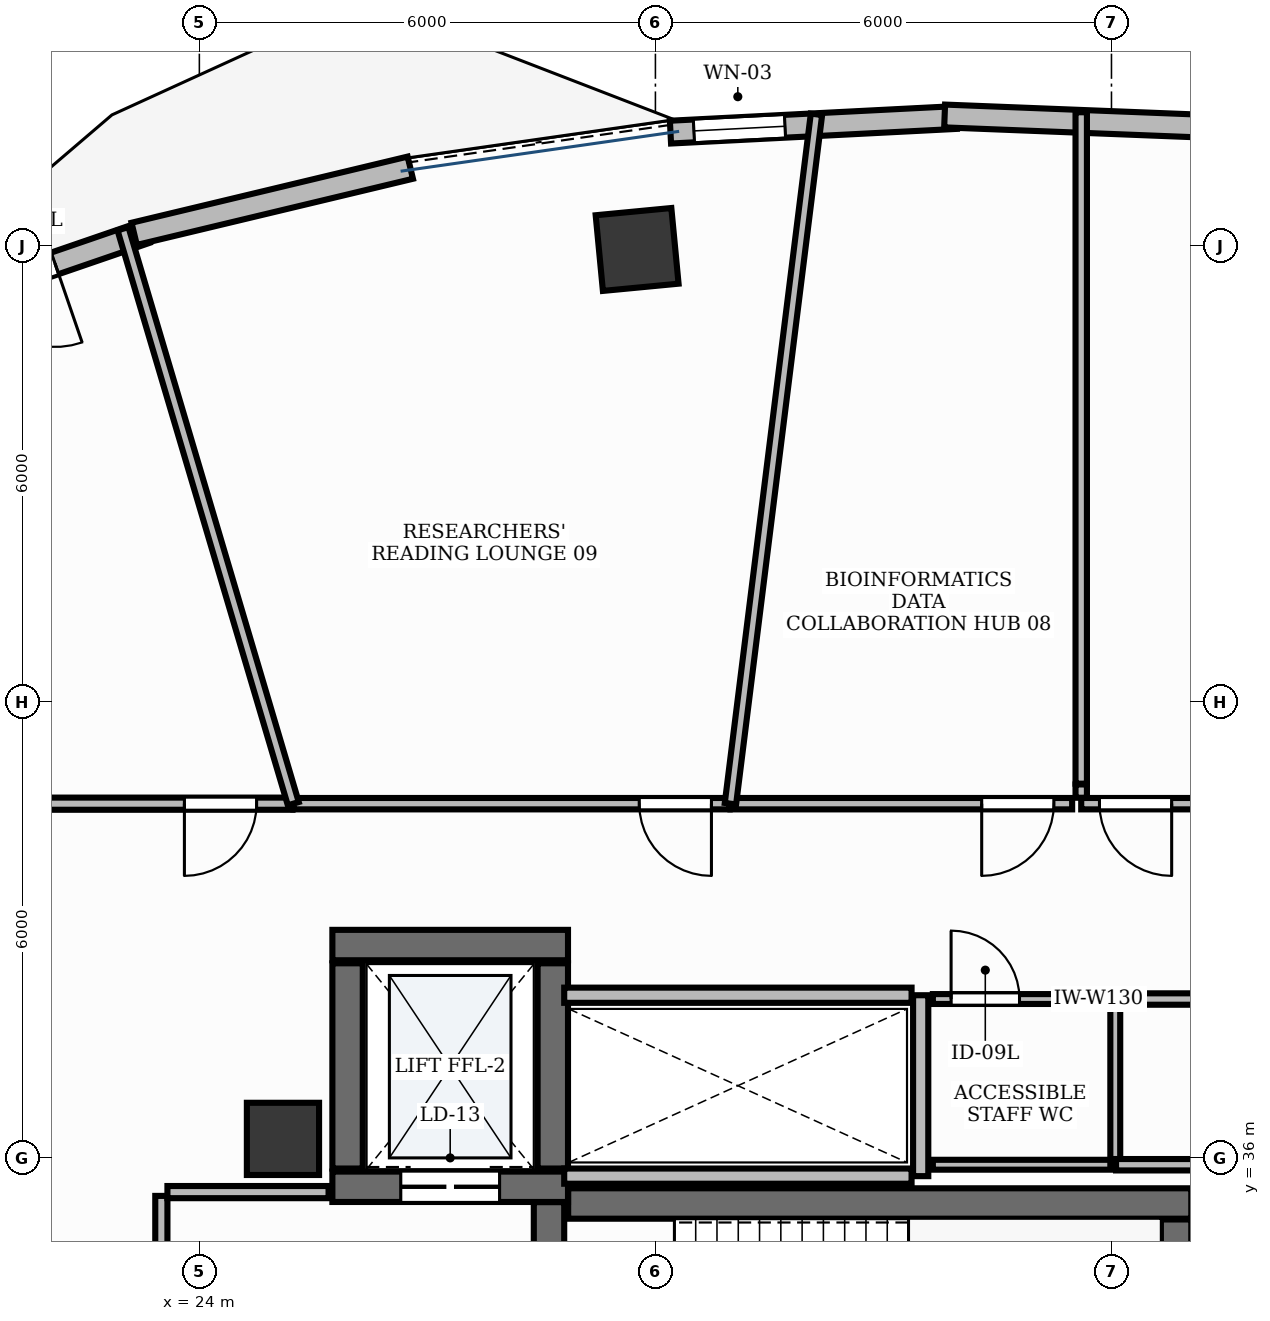
"""IFC4 building model, lengths in metres.
Left out: names, types, materials, properties, quantities, classifications, styles, units other than length and angle.
Written with IfcOpenShell. Run it as: python <this file> out.ifc"""

import sys

from ifc_helpers import new_model, si_unit, direction, frame, frame_2d, origin, origin_2d, place, context, subcontext, project, spatial, rectangle, extrude, element, fill, save


model = new_model("IFC4")
c1 = context("Model", 3, precision=1e-05, world=origin(), true_north=direction((0.0, 1.0)))
c2 = subcontext(c1, "Body", "Model", "MODEL_VIEW")
j1 = project(units=[si_unit("LENGTHUNIT", "METRE"), si_unit("PLANEANGLEUNIT", "RADIAN")], contexts=[c1])
p1 = place(None, origin())
s1 = spatial("IfcSite", under=j1, at=p1, CompositionType="ELEMENT")
p2 = place(p1, origin())
s2 = spatial("IfcBuilding", under=s1, at=p2, CompositionType="ELEMENT")
p3 = place(p2, frame((0.0, 0.0, 222.6)))
s3 = spatial("IfcBuildingStorey", under=s2, at=p3, CompositionType="ELEMENT", Elevation=222.6)
p4 = place(p3, frame((28.852, 35.4, 0.0), z_axis=(0.0, 0.0, 1.0), x_axis=(1.0, 0.0, 0.0)))
e1 = element("IfcWall", 1, at=p4, inside=s3, PredefinedType="SHEAR", context=c2, shape_type="SweptSolid", body=[
    extrude(rectangle(XDim=8.198, YDim=0.4, at=frame_2d((4.099, 0.0))), origin(), (0.0, 0.0, 1.0), 3.9),
])
p5 = place(p3, frame((36.85, 32.11, 0.0), z_axis=(0.0, 0.0, 1.0), x_axis=(0.0, 1.0, 0.0)))
e2 = element("IfcWall", 2, at=p5, inside=s3, PredefinedType="SHEAR", context=c2, shape_type="SweptSolid", body=[
    extrude(rectangle(XDim=3.08, YDim=0.4, at=frame_2d((1.54, 0.0))), origin(), (0.0, 0.0, 1.0), 3.9),
])
p6 = place(p3, frame((28.6, 32.11, 0.0), z_axis=(0.0, 0.0, 1.0), x_axis=(0.0, 1.0, 0.0)))
e3 = element("IfcWall", 3, at=p6, inside=s3, PredefinedType="SHEAR", context=c2, shape_type="SweptSolid", body=[
    extrude(rectangle(XDim=3.308, YDim=0.4, at=frame_2d((1.654, 0.0))), origin(), (0.0, 0.0, 1.0), 3.9),
])
p7 = place(p6, frame((0.2, 0.0, 0.0)))
e4 = element("IfcOpeningElement", 4, at=p7, cuts=e3, PredefinedType="OPENING", context=c2, shape_type="SweptSolid", body=[
    extrude(rectangle(XDim=1.05, YDim=2.15, at=frame_2d((0.525, 1.075))), frame((0.0, 0.215, 0.0), z_axis=(0.0, -1.0, 0.0), x_axis=(1.0, 0.0, 0.0)), (0.0, 0.0, 1.0), 0.43),
])
p8 = place(p3, frame((25.75, 38.8, 0.0), z_axis=(0.0, 0.0, 1.0), x_axis=(1.0, 0.0, 0.0)))
e5 = element("IfcWall", 5, at=p8, inside=s3, PredefinedType="SHEAR", context=c2, shape_type="SweptSolid", body=[
    extrude(rectangle(XDim=3.1, YDim=0.4, at=frame_2d((1.55, 0.0))), origin(), (0.0, 0.0, 1.0), 3.9),
])
p9 = place(p3, frame((25.75, 35.62, 0.0), z_axis=(0.0, 0.0, 1.0), x_axis=(1.0, 0.0, 0.0)))
e6 = element("IfcWall", 6, at=p9, inside=s3, PredefinedType="SHEAR", context=c2, shape_type="SweptSolid", body=[
    extrude(rectangle(XDim=3.1, YDim=0.4, at=frame_2d((1.55, 0.0))), origin(), (0.0, 0.0, 1.0), 3.9),
])
p10 = place(p9, frame((0.9, 0.0, 0.0)))
e7 = element("IfcOpeningElement", 7, at=p10, cuts=e6, PredefinedType="OPENING", context=c2, shape_type="SweptSolid", body=[
    extrude(rectangle(XDim=1.3, YDim=2.2, at=frame_2d((0.65, 1.1))), frame((0.0, 0.215, 0.0), z_axis=(0.0, -1.0, 0.0), x_axis=(1.0, 0.0, 0.0)), (0.0, 0.0, 1.0), 0.43),
])
for number, where, z_axis, x_axis in (
    (8, (25.95, 35.86, 0.0), (0.0, 0.0, 1.0), (0.0, 1.0, 0.0)),
    (9, (28.65, 35.86, 0.0), (0.0, 0.0, 1.0), (0.0, 1.0, 0.0)),
):
    element("IfcWall", number, at=place(p3, frame(where, z_axis=z_axis, x_axis=x_axis)), inside=s3, PredefinedType="SHEAR", context=c2, shape_type="SweptSolid", body=[
        extrude(rectangle(XDim=2.7, YDim=0.4, at=frame_2d((1.35, 0.0))), origin(), (0.0, 0.0, 1.0), 3.9),
    ])
p11 = place(p3, frame((25.1, 36.25, -0.0), z_axis=(0.0, 0.0, 1.0), x_axis=(1.0, 0.0, 0.0)))
e10 = element("IfcColumn", 10, at=p11, inside=s3, PredefinedType="PILASTER", context=c2, shape_type="SweptSolid", body=[
    extrude(rectangle(XDim=0.95, YDim=0.95, at=origin_2d()), origin(), (0.0, 0.0, 1.0), 3.901),
])
p12 = place(p3, frame((29.759, 47.951, -0.0), z_axis=(0.0, 0.0, 1.0), x_axis=(0.995462868748, 0.095150811579, 0.0)))
e11 = element("IfcColumn", 11, at=p12, inside=s3, PredefinedType="COLUMN", context=c2, shape_type="SweptSolid", body=[
    extrude(rectangle(XDim=1.0, YDim=1.0, at=origin_2d()), origin(), (0.0, 0.0, 1.0), 3.901),
])
p13 = place(p3, frame((33.958, 49.688, 0.0), z_axis=(0.0, 0.0, 1.0), x_axis=(-0.998693948377, -0.051092049037, 0.0)))
e12 = element("IfcWall", 12, at=p13, inside=s3, PredefinedType="STANDARD", context=c2, shape_type="SweptSolid", body=[
    extrude(rectangle(XDim=3.765, YDim=0.3, at=frame_2d((1.883, 0.0))), origin(), (0.0, 0.0, 1.0), 3.9),
])
p14 = place(p13, frame((2.257, 0.0, 0.9)))
e13 = element("IfcOpeningElement", 13, at=p14, cuts=e12, PredefinedType="OPENING", context=c2, shape_type="SweptSolid", body=[
    extrude(rectangle(XDim=1.2, YDim=2.7, at=frame_2d((0.6, 1.35))), frame((0.0, 0.165, 0.0), z_axis=(0.0, -1.0, 0.0), x_axis=(1.0, 0.0, 0.0)), (0.0, 0.0, 1.0), 0.33),
])
p15 = place(p3, frame((23.296, 48.18, 0.0), z_axis=(0.0, 0.0, 1.0), x_axis=(-0.945702753898, -0.325032769531, 0.0)))
e14 = element("IfcWall", 14, at=p15, inside=s3, PredefinedType="STANDARD", context=c2, shape_type="SweptSolid", body=[
    extrude(rectangle(XDim=3.629, YDim=0.3, at=frame_2d((1.815, 0.0))), origin(), (0.0, 0.0, 1.0), 3.9),
])
p16 = place(p15, frame((1.265, 0.0, 0.0)))
e15 = element("IfcOpeningElement", 15, at=p16, cuts=e14, PredefinedType="OPENING", context=c2, shape_type="SweptSolid", body=[
    extrude(rectangle(XDim=1.1, YDim=2.15, at=frame_2d((0.55, 1.075))), frame((0.0, 0.165, 0.0), z_axis=(0.0, -1.0, 0.0), x_axis=(1.0, 0.0, 0.0)), (0.0, 0.0, 1.0), 0.33),
])
p17 = place(p3, frame((37.609, 49.557, 0.0), z_axis=(0.0, 0.0, 1.0), x_axis=(-0.999221923177, 0.039440439173, 0.0)))
e16 = element("IfcWall", 16, at=p17, inside=s3, PredefinedType="STANDARD", context=c2, shape_type="SweptSolid", body=[
    extrude(rectangle(XDim=3.807, YDim=0.3, at=frame_2d((1.903, 0.0))), origin(), (0.0, 0.0, 1.0), 3.9),
])
p18 = place(p3, frame((26.775, 49.027, 0.0), z_axis=(0.0, 0.0, 1.0), x_axis=(-0.972475629939, -0.233004611918, 0.0)))
e17 = element("IfcWall", 17, at=p18, inside=s3, PredefinedType="STANDARD", context=c2, shape_type="SweptSolid", body=[
    extrude(rectangle(XDim=3.735, YDim=0.3, at=frame_2d((1.868, 0.0))), origin(), (0.0, 0.0, 1.0), 3.9),
])
p19 = place(p3, frame((33.49, 35.76, 0.0), z_axis=(0.0, 0.0, 1.0), x_axis=(0.0, 1.0, 0.0)))
e18 = element("IfcWall", 18, at=p19, inside=s3, PredefinedType="PARTITIONING", context=c2, shape_type="SweptSolid", body=[
    extrude(rectangle(XDim=2.38, YDim=0.2, at=frame_2d((1.19, 0.0))), origin(), (0.0, 0.0, 1.0), 2.91),
])
for number, where, z_axis, x_axis in (
    (19, (28.8, 35.76, 0.0), (0.0, 0.0, 1.0), (1.0, 0.0, 0.0)),
    (20, (28.8, 38.14, 0.0), (0.0, 0.0, 1.0), (1.0, 0.0, 0.0)),
):
    element("IfcWall", number, at=place(p3, frame(where, z_axis=z_axis, x_axis=x_axis)), inside=s3, PredefinedType="PARTITIONING", context=c2, shape_type="SweptSolid", body=[
        extrude(rectangle(XDim=4.57, YDim=0.2, at=frame_2d((2.285, 0.0))), origin(), (0.0, 0.0, 1.0), 2.91),
    ])
p20 = place(p3, frame((23.5, 32.1, 0.0), z_axis=(0.0, 0.0, 1.0), x_axis=(0.0, 1.0, 0.0)))
e21 = element("IfcWall", 21, at=p20, inside=s3, PredefinedType="PARTITIONING", context=c2, shape_type="SweptSolid", body=[
    extrude(rectangle(XDim=3.4, YDim=0.16, at=frame_2d((1.7, 0.0))), origin(), (0.0, 0.0, 1.0), 2.91),
])
p21 = place(p20, frame((1.175, 0.0, 0.0)))
e22 = element("IfcOpeningElement", 22, at=p21, cuts=e21, PredefinedType="OPENING", context=c2, shape_type="SweptSolid", body=[
    extrude(rectangle(XDim=1.05, YDim=2.15, at=frame_2d((0.525, 1.075))), frame((0.0, 0.095, 0.0), z_axis=(0.0, -1.0, 0.0), x_axis=(1.0, 0.0, 0.0)), (0.0, 0.0, 1.0), 0.19),
])
p22 = place(p3, frame((23.58, 35.55, 0.0), z_axis=(0.0, 0.0, 1.0), x_axis=(1.0, 0.0, 0.0)))
e23 = element("IfcWall", 23, at=p22, inside=s3, PredefinedType="PARTITIONING", context=c2, shape_type="SweptSolid", body=[
    extrude(rectangle(XDim=2.12, YDim=0.16, at=frame_2d((1.06, 0.0))), origin(), (0.0, 0.0, 1.0), 2.91),
])
p23 = place(p3, frame((33.65, 38.09, 0.0), z_axis=(0.0, 0.0, 1.0), x_axis=(1.0, 0.0, 0.0)))
e24 = element("IfcWall", 24, at=p23, inside=s3, PredefinedType="PARTITIONING", context=c2, shape_type="SweptSolid", body=[
    extrude(rectangle(XDim=2.4, YDim=0.13, at=frame_2d((1.2, 0.0))), origin(), (0.0, 0.0, 1.0), 2.91),
])
p24 = place(p23, frame((0.24, 0.0, 0.0)))
e25 = element("IfcOpeningElement", 25, at=p24, cuts=e24, PredefinedType="OPENING", context=c2, shape_type="SweptSolid", body=[
    extrude(rectangle(XDim=0.9, YDim=2.15, at=frame_2d((0.45, 1.075))), frame((0.0, 0.08, 0.0), z_axis=(0.0, -1.0, 0.0), x_axis=(1.0, 0.0, 0.0)), (0.0, 0.0, 1.0), 0.16),
])
p25 = place(p3, frame((37.2, 40.66, 0.0), z_axis=(0.0, 0.0, 1.0), x_axis=(-1.0, 0.0, 0.0)))
e26 = element("IfcWall", 26, at=p25, inside=s3, PredefinedType="PARTITIONING", context=c2, shape_type="SweptSolid", body=[
    extrude(rectangle(XDim=1.598, YDim=0.15, at=frame_2d((0.799, 0.0))), origin(), (0.0, 0.0, 1.0), 2.91),
])
p26 = place(p25, frame((0.408, 0.0, 0.0)))
e27 = element("IfcOpeningElement", 27, at=p26, cuts=e26, PredefinedType="OPENING", context=c2, shape_type="SweptSolid", body=[
    extrude(rectangle(XDim=0.95, YDim=2.15, at=frame_2d((0.475, 1.075))), frame((0.0, 0.09, 0.0), z_axis=(0.0, -1.0, 0.0), x_axis=(1.0, 0.0, 0.0)), (0.0, 0.0, 1.0), 0.18),
])
p27 = place(p3, frame((35.483, 40.66, 0.0), z_axis=(0.0, 0.0, 1.0), x_axis=(-1.0, 0.0, 0.0)))
e28 = element("IfcWall", 28, at=p27, inside=s3, PredefinedType="PARTITIONING", context=c2, shape_type="SweptSolid", body=[
    extrude(rectangle(XDim=4.496, YDim=0.15, at=frame_2d((2.248, 0.0))), origin(), (0.0, 0.0, 1.0), 2.91),
])
p28 = place(p27, frame((0.24, 0.0, 0.0)))
e29 = element("IfcOpeningElement", 29, at=p28, cuts=e28, PredefinedType="OPENING", context=c2, shape_type="SweptSolid", body=[
    extrude(rectangle(XDim=0.95, YDim=2.15, at=frame_2d((0.475, 1.075))), frame((0.0, 0.09, 0.0), z_axis=(0.0, -1.0, 0.0), x_axis=(1.0, 0.0, 0.0)), (0.0, 0.0, 1.0), 0.18),
])
p29 = place(p3, frame((30.977, 40.66, 0.0), z_axis=(0.0, 0.0, 1.0), x_axis=(-1.0, 0.0, 0.0)))
e30 = element("IfcWall", 30, at=p29, inside=s3, PredefinedType="PARTITIONING", context=c2, shape_type="SweptSolid", body=[
    extrude(rectangle(XDim=5.741, YDim=0.15, at=frame_2d((2.871, 0.0))), origin(), (0.0, 0.0, 1.0), 2.91),
])
p30 = place(p29, frame((0.24, 0.0, 0.0)))
e31 = element("IfcOpeningElement", 31, at=p30, cuts=e30, PredefinedType="OPENING", context=c2, shape_type="SweptSolid", body=[
    extrude(rectangle(XDim=0.95, YDim=2.15, at=frame_2d((0.475, 1.075))), frame((0.0, 0.09, 0.0), z_axis=(0.0, -1.0, 0.0), x_axis=(1.0, 0.0, 0.0)), (0.0, 0.0, 1.0), 0.18),
])
p31 = place(p3, frame((25.226, 40.66, 0.0), z_axis=(0.0, 0.0, 1.0), x_axis=(-1.0, 0.0, 0.0)))
e32 = element("IfcWall", 32, at=p31, inside=s3, PredefinedType="PARTITIONING", context=c2, shape_type="SweptSolid", body=[
    extrude(rectangle(XDim=3.476, YDim=0.16, at=frame_2d((1.738, 0.0))), origin(), (0.0, 0.0, 1.0), 2.91),
])
p32 = place(p31, frame((0.472, 0.0, 0.0)))
e33 = element("IfcOpeningElement", 33, at=p32, cuts=e32, PredefinedType="OPENING", context=c2, shape_type="SweptSolid", body=[
    extrude(rectangle(XDim=0.95, YDim=2.15, at=frame_2d((0.475, 1.075))), frame((0.0, 0.095, 0.0), z_axis=(0.0, -1.0, 0.0), x_axis=(1.0, 0.0, 0.0)), (0.0, 0.0, 1.0), 0.19),
])
p33 = place(p3, frame((36.05, 35.91, 0.0), z_axis=(0.0, 0.0, 1.0), x_axis=(-1.0, 0.0, 0.0)))
e34 = element("IfcWall", 34, at=p33, inside=s3, PredefinedType="PARTITIONING", context=c2, shape_type="SweptSolid", body=[
    extrude(rectangle(XDim=2.4, YDim=0.13, at=frame_2d((1.2, 0.0))), origin(), (0.0, 0.0, 1.0), 2.91),
])
p34 = place(p3, frame((36.05, 38.09, 0.0), z_axis=(0.0, 0.0, 1.0), x_axis=(0.0, -1.0, 0.0)))
e35 = element("IfcWall", 35, at=p34, inside=s3, PredefinedType="PARTITIONING", context=c2, shape_type="SweptSolid", body=[
    extrude(rectangle(XDim=2.18, YDim=0.13, at=frame_2d((1.09, 0.0))), origin(), (0.0, 0.0, 1.0), 2.91),
])
p35 = place(p3, frame((35.602, 40.923, 0.0), z_axis=(0.0, 0.0, 1.0), x_axis=(0.0, 1.0, 0.0)))
e36 = element("IfcWall", 36, at=p35, inside=s3, PredefinedType="PARTITIONING", context=c2, shape_type="SweptSolid", body=[
    extrude(rectangle(XDim=8.833, YDim=0.15, at=frame_2d((4.417, 0.0))), origin(), (0.0, 0.0, 1.0), 2.91),
])
p36 = place(p3, frame((37.35, 35.91, 0.0), z_axis=(0.0, 0.0, 1.0), x_axis=(-1.0, 0.0, 0.0)))
e37 = element("IfcWall", 37, at=p36, inside=s3, PredefinedType="PARTITIONING", context=c2, shape_type="SweptSolid", body=[
    extrude(rectangle(XDim=1.29, YDim=0.15, at=frame_2d((0.645, 0.0))), origin(), (0.0, 0.0, 1.0), 2.91),
])
p37 = place(p3, frame((36.06, 38.09, 0.0), z_axis=(0.0, 0.0, 1.0), x_axis=(1.0, 0.0, 0.0)))
e38 = element("IfcWall", 38, at=p37, inside=s3, PredefinedType="PARTITIONING", context=c2, shape_type="SweptSolid", body=[
    extrude(rectangle(XDim=1.14, YDim=0.15, at=frame_2d((0.57, 0.0))), origin(), (0.0, 0.0, 1.0), 2.91),
])
p38 = place(p3, frame((35.602, 40.738, 0.0), z_axis=(0.0, 0.0, 1.0), x_axis=(0.0, 1.0, 0.0)))
e39 = element("IfcWall", 39, at=p38, inside=s3, PredefinedType="PARTITIONING", context=c2, shape_type="SweptSolid", body=[
    extrude(rectangle(XDim=0.175, YDim=0.15, at=frame_2d((0.087, 0.0))), origin(), (0.0, 0.0, 1.0), 2.91),
])
p39 = place(p3, frame((30.987, 40.66, 0.0), z_axis=(0.0, 0.0, 1.0), x_axis=(0.123837473271, 0.992302514465, 0.0)))
e40 = element("IfcWall", 40, at=p39, inside=s3, PredefinedType="PARTITIONING", context=c2, shape_type="SweptSolid", body=[
    extrude(rectangle(XDim=9.14, YDim=0.15, at=frame_2d((4.57, 0.0))), origin(), (0.0, 0.0, 1.0), 2.91),
])
p40 = place(p3, frame((25.236, 40.66, 0.0), z_axis=(0.0, 0.0, 1.0), x_axis=(-0.284007193362, 0.958822149368, 0.0)))
e41 = element("IfcWall", 41, at=p40, inside=s3, PredefinedType="PARTITIONING", context=c2, shape_type="SweptSolid", body=[
    extrude(rectangle(XDim=7.889, YDim=0.15, at=frame_2d((3.944, 0.0))), origin(), (0.0, 0.0, 1.0), 2.91),
])
p41 = place(p14, origin())
e42 = element("IfcWindow", 42, at=p41, inside=s3, PartitioningType="SINGLE_PANEL", PredefinedType="WINDOW", context=c2, shape_type="SweptSolid", body=[
    extrude(rectangle(XDim=1.2, YDim=2.7, at=frame_2d((0.6, 1.35))), frame((0.0, 0.03, 0.0), z_axis=(0.0, -1.0, 0.0), x_axis=(1.0, 0.0, 0.0)), (0.0, 0.0, 1.0), 0.06),
])
fill(e13, e42)
p42 = place(p16, origin())
e43 = element("IfcDoor", 43, at=p42, inside=s3, OperationType="SINGLE_SWING_LEFT", PredefinedType="DOOR", context=c2, shape_type="SweptSolid", body=[
    extrude(rectangle(XDim=1.1, YDim=2.15, at=frame_2d((0.55, 1.075))), frame((0.0, 0.025, 0.0), z_axis=(0.0, -1.0, 0.0), x_axis=(1.0, 0.0, 0.0)), (0.0, 0.0, 1.0), 0.05),
])
fill(e15, e43)
p43 = place(p10, origin())
e44 = element("IfcDoor", 44, at=p43, inside=s3, OperationType="DOUBLE_DOOR_SLIDING", PredefinedType="DOOR", context=c2, shape_type="SweptSolid", body=[
    extrude(rectangle(XDim=1.3, YDim=2.2, at=frame_2d((0.65, 1.1))), frame((0.0, 0.025, 0.0), z_axis=(0.0, -1.0, 0.0), x_axis=(1.0, 0.0, 0.0)), (0.0, 0.0, 1.0), 0.05),
])
fill(e7, e44)
p44 = place(p24, origin())
e45 = element("IfcDoor", 45, at=p44, inside=s3, OperationType="SINGLE_SWING_LEFT", PredefinedType="DOOR", context=c2, shape_type="SweptSolid", body=[
    extrude(rectangle(XDim=0.9, YDim=2.15, at=frame_2d((0.45, 1.075))), frame((0.0, 0.025, 0.0), z_axis=(0.0, -1.0, 0.0), x_axis=(1.0, 0.0, 0.0)), (0.0, 0.0, 1.0), 0.05),
])
fill(e25, e45)
p45 = place(p26, origin())
e46 = element("IfcDoor", 46, at=p45, inside=s3, OperationType="SINGLE_SWING_LEFT", PredefinedType="DOOR", context=c2, shape_type="SweptSolid", body=[
    extrude(rectangle(XDim=0.95, YDim=2.15, at=frame_2d((0.475, 1.075))), frame((0.0, 0.025, 0.0), z_axis=(0.0, -1.0, 0.0), x_axis=(1.0, 0.0, 0.0)), (0.0, 0.0, 1.0), 0.05),
])
fill(e27, e46)
p46 = place(p28, origin())
e47 = element("IfcDoor", 47, at=p46, inside=s3, OperationType="SINGLE_SWING_RIGHT", PredefinedType="DOOR", context=c2, shape_type="SweptSolid", body=[
    extrude(rectangle(XDim=0.95, YDim=2.15, at=frame_2d((0.475, 1.075))), frame((0.0, 0.025, 0.0), z_axis=(0.0, -1.0, 0.0), x_axis=(1.0, 0.0, 0.0)), (0.0, 0.0, 1.0), 0.05),
])
fill(e29, e47)
p47 = place(p30, origin())
e48 = element("IfcDoor", 48, at=p47, inside=s3, OperationType="SINGLE_SWING_LEFT", PredefinedType="DOOR", context=c2, shape_type="SweptSolid", body=[
    extrude(rectangle(XDim=0.95, YDim=2.15, at=frame_2d((0.475, 1.075))), frame((0.0, 0.025, 0.0), z_axis=(0.0, -1.0, 0.0), x_axis=(1.0, 0.0, 0.0)), (0.0, 0.0, 1.0), 0.05),
])
fill(e31, e48)
p48 = place(p32, origin())
e49 = element("IfcDoor", 49, at=p48, inside=s3, OperationType="SINGLE_SWING_RIGHT", PredefinedType="DOOR", context=c2, shape_type="SweptSolid", body=[
    extrude(rectangle(XDim=0.95, YDim=2.15, at=frame_2d((0.475, 1.075))), frame((0.0, 0.025, 0.0), z_axis=(0.0, -1.0, 0.0), x_axis=(1.0, 0.0, 0.0)), (0.0, 0.0, 1.0), 0.05),
])
fill(e33, e49)
save(model, sys.argv[1])
